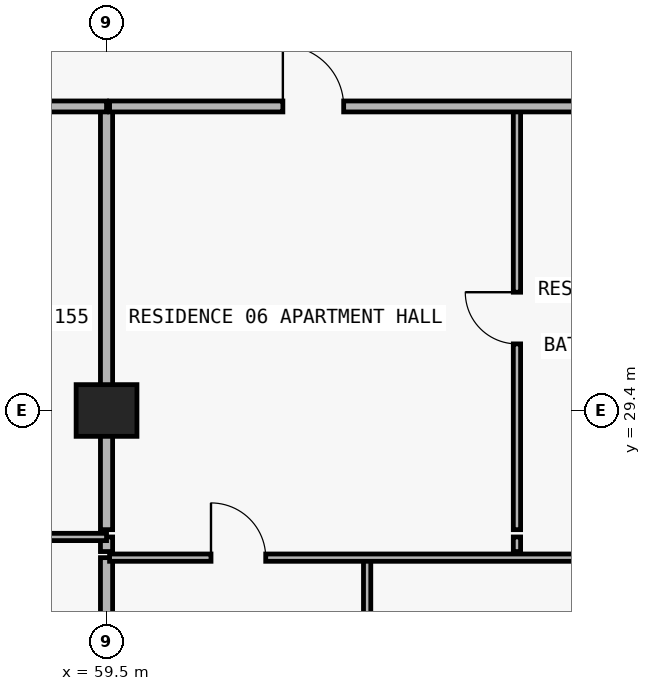
"""IFC4 building model, lengths in metres.
Left out: names, types, materials, properties, quantities, classifications, styles, units other than length and angle.
Written with IfcOpenShell. Run it as: python <this file> out.ifc"""

import sys

from ifc_helpers import new_model, si_unit, direction, frame, frame_2d, origin, origin_2d, place, context, subcontext, project, spatial, rectangle, extrude, element, fill, save


model = new_model("IFC4")
c1 = context("Model", 3, precision=1e-05, world=origin(), true_north=direction((0.0, 1.0)))
c2 = subcontext(c1, "Body", "Model", "MODEL_VIEW")
j1 = project(units=[si_unit("LENGTHUNIT", "METRE"), si_unit("PLANEANGLEUNIT", "RADIAN")], contexts=[c1])
p1 = place(None, origin())
s1 = spatial("IfcSite", under=j1, at=p1, CompositionType="ELEMENT")
p2 = place(p1, origin())
s2 = spatial("IfcBuilding", under=s1, at=p2, CompositionType="ELEMENT")
p3 = place(p2, frame((0.0, 0.0, 87.9)))
s3 = spatial("IfcBuildingStorey", under=s2, at=p3, CompositionType="ELEMENT", Elevation=87.9)
p4 = place(p3, frame((59.5, 29.4, 0.0), z_axis=(0.0, 0.0, 1.0), x_axis=(1.0, 0.0, 0.0)))
e1 = element("IfcColumn", 1, at=p4, inside=s3, PredefinedType="COLUMN", context=c2, shape_type="SweptSolid", body=[
    extrude(rectangle(XDim=1.0, YDim=0.85, at=origin_2d()), origin(), (0.0, 0.0, 1.0), 3.05),
])
p5 = place(p3, frame((59.5, 22.29, 0.0), z_axis=(0.0, 0.0, 1.0), x_axis=(0.0, 1.0, 0.0)))
e2 = element("IfcWall", 2, at=p5, inside=s3, PredefinedType="PARTITIONING", context=c2, shape_type="SweptSolid", body=[
    extrude(rectangle(XDim=4.69, YDim=0.2, at=frame_2d((2.345, 0.0))), origin(), (0.0, 0.0, 1.0), 2.174),
])
p6 = place(p3, frame((59.5, 27.08, 0.0), z_axis=(0.0, 0.0, 1.0), x_axis=(0.0, 1.0, 0.0)))
e3 = element("IfcWall", 3, at=p6, inside=s3, PredefinedType="PARTITIONING", context=c2, shape_type="SweptSolid", body=[
    extrude(rectangle(XDim=0.24, YDim=0.2, at=frame_2d((0.12, 0.0))), origin(), (0.0, 0.0, 1.0), 2.174),
])
p7 = place(p3, frame((59.5, 27.44, 0.0), z_axis=(0.0, 0.0, 1.0), x_axis=(0.0, 1.0, 0.0)))
e4 = element("IfcWall", 4, at=p7, inside=s3, PredefinedType="PARTITIONING", context=c2, shape_type="SweptSolid", body=[
    extrude(rectangle(XDim=6.96, YDim=0.2, at=frame_2d((3.48, 0.0))), origin(), (0.0, 0.0, 1.0), 2.174),
])
p8 = place(p3, frame((63.786, 22.29, 0.0), z_axis=(0.0, 0.0, 1.0), x_axis=(0.0, 1.0, 0.0)))
e5 = element("IfcWall", 5, at=p8, inside=s3, PredefinedType="PARTITIONING", context=c2, shape_type="SweptSolid", body=[
    extrude(rectangle(XDim=4.69, YDim=0.12, at=frame_2d((2.345, 0.0))), origin(), (0.0, 0.0, 1.0), 3.05),
])
p9 = place(p8, frame((1.895, 0.0, 0.0)))
e6 = element("IfcOpeningElement", 6, at=p9, cuts=e5, PredefinedType="OPENING", context=c2, shape_type="SweptSolid", body=[
    extrude(rectangle(XDim=0.9, YDim=2.15, at=frame_2d((0.45, 1.075))), frame((0.0, 0.07, 0.0), z_axis=(0.0, -1.0, 0.0), x_axis=(1.0, 0.0, 0.0)), (0.0, 0.0, 1.0), 0.14),
])
p10 = place(p3, frame((66.25, 27.08, 0.0), z_axis=(0.0, 0.0, 1.0), x_axis=(0.0, 1.0, 0.0)))
e7 = element("IfcWall", 7, at=p10, inside=s3, PredefinedType="PARTITIONING", context=c2, shape_type="SweptSolid", body=[
    extrude(rectangle(XDim=0.24, YDim=0.12, at=frame_2d((0.12, 0.0))), origin(), (0.0, 0.0, 1.0), 3.05),
])
p11 = place(p3, frame((66.25, 27.44, 0.0), z_axis=(0.0, 0.0, 1.0), x_axis=(0.0, 1.0, 0.0)))
e8 = element("IfcWall", 8, at=p11, inside=s3, PredefinedType="PARTITIONING", context=c2, shape_type="SweptSolid", body=[
    extrude(rectangle(XDim=6.96, YDim=0.12, at=frame_2d((3.48, 0.0))), origin(), (0.0, 0.0, 1.0), 3.05),
])
p12 = place(p11, frame((3.055, 0.0, 0.0)))
e9 = element("IfcOpeningElement", 9, at=p12, cuts=e8, PredefinedType="OPENING", context=c2, shape_type="SweptSolid", body=[
    extrude(rectangle(XDim=0.85, YDim=2.1, at=frame_2d((0.425, 1.05))), frame((0.0, 0.07, 0.0), z_axis=(0.0, -1.0, 0.0), x_axis=(1.0, 0.0, 0.0)), (0.0, 0.0, 1.0), 0.14),
])
p13 = place(p3, frame((59.55, 26.98, 0.0), z_axis=(0.0, 0.0, 1.0), x_axis=(1.0, 0.0, 0.0)))
e10 = element("IfcWall", 10, at=p13, inside=s3, PredefinedType="PARTITIONING", context=c2, shape_type="SweptSolid", body=[
    extrude(rectangle(XDim=8.35, YDim=0.12, at=frame_2d((4.175, 0.0))), origin(), (0.0, 0.0, 1.0), 3.05),
])
p14 = place(p13, frame((1.668, 0.0, 0.0)))
e11 = element("IfcOpeningElement", 11, at=p14, cuts=e10, PredefinedType="OPENING", context=c2, shape_type="SweptSolid", body=[
    extrude(rectangle(XDim=0.9, YDim=2.15, at=frame_2d((0.45, 1.075))), frame((0.0, 0.07, 0.0), z_axis=(0.0, -1.0, 0.0), x_axis=(1.0, 0.0, 0.0)), (0.0, 0.0, 1.0), 0.14),
])
p15 = place(p3, frame((55.9, 27.32, 0.0), z_axis=(0.0, 0.0, 1.0), x_axis=(1.0, 0.0, 0.0)))
e12 = element("IfcWall", 12, at=p15, inside=s3, PredefinedType="PARTITIONING", context=c2, shape_type="SweptSolid", body=[
    extrude(rectangle(XDim=3.6, YDim=0.12, at=frame_2d((1.8, 0.0))), origin(), (0.0, 0.0, 1.0), 3.05),
])
p16 = place(p3, frame((55.9, 34.4, 0.0), z_axis=(0.0, 0.0, 1.0), x_axis=(1.0, 0.0, 0.0)))
e13 = element("IfcWall", 13, at=p16, inside=s3, PredefinedType="PARTITIONING", context=c2, shape_type="SweptSolid", body=[
    extrude(rectangle(XDim=3.6, YDim=0.18, at=frame_2d((1.8, 0.0))), origin(), (0.0, 0.0, 1.0), 3.05),
])
p17 = place(p3, frame((59.55, 34.4, 0.0), z_axis=(0.0, 0.0, 1.0), x_axis=(1.0, 0.0, 0.0)))
e14 = element("IfcWall", 14, at=p17, inside=s3, PredefinedType="PARTITIONING", context=c2, shape_type="SweptSolid", body=[
    extrude(rectangle(XDim=10.55, YDim=0.18, at=frame_2d((5.275, 0.0))), origin(), (0.0, 0.0, 1.0), 3.05),
])
p18 = place(p17, frame((2.85, 0.0, 0.0)))
e15 = element("IfcOpeningElement", 15, at=p18, cuts=e14, PredefinedType="OPENING", context=c2, shape_type="SweptSolid", body=[
    extrude(rectangle(XDim=1.0, YDim=2.2, at=frame_2d((0.5, 1.1))), frame((0.0, 0.1, 0.0), z_axis=(0.0, -1.0, 0.0), x_axis=(1.0, 0.0, 0.0)), (0.0, 0.0, 1.0), 0.2),
])
p19 = place(p18, origin())
e16 = element("IfcDoor", 16, at=p19, inside=s3, OperationType="SINGLE_SWING_LEFT", PredefinedType="DOOR", context=c2, shape_type="SweptSolid", body=[
    extrude(rectangle(XDim=1.0, YDim=2.2, at=frame_2d((0.5, 1.1))), frame((0.0, 0.025, 0.0), z_axis=(0.0, -1.0, 0.0), x_axis=(1.0, 0.0, 0.0)), (0.0, 0.0, 1.0), 0.05),
])
fill(e15, e16)
p20 = place(p12, origin())
e17 = element("IfcDoor", 17, at=p20, inside=s3, OperationType="SINGLE_SWING_RIGHT", PredefinedType="DOOR", context=c2, shape_type="SweptSolid", body=[
    extrude(rectangle(XDim=0.85, YDim=2.1, at=frame_2d((0.425, 1.05))), frame((0.0, 0.025, 0.0), z_axis=(0.0, -1.0, 0.0), x_axis=(1.0, 0.0, 0.0)), (0.0, 0.0, 1.0), 0.05),
])
fill(e9, e17)
p21 = place(p14, origin())
e18 = element("IfcDoor", 18, at=p21, inside=s3, OperationType="SINGLE_SWING_LEFT", PredefinedType="DOOR", context=c2, shape_type="SweptSolid", body=[
    extrude(rectangle(XDim=0.9, YDim=2.15, at=frame_2d((0.45, 1.075))), frame((0.0, 0.025, 0.0), z_axis=(0.0, -1.0, 0.0), x_axis=(1.0, 0.0, 0.0)), (0.0, 0.0, 1.0), 0.05),
])
fill(e11, e18)
save(model, sys.argv[1])
